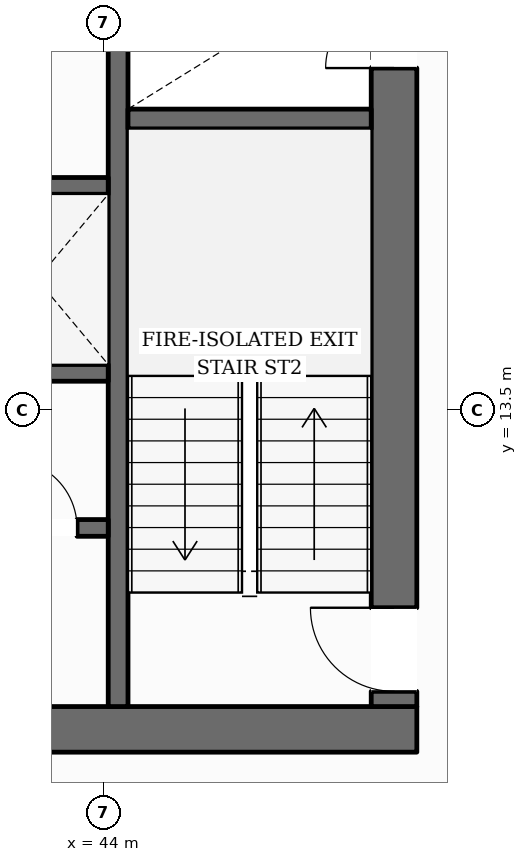
"""IFC4 building model, lengths in metres.
Left out: names, types, materials, properties, quantities, classifications, styles, units other than length and angle.
Written with IfcOpenShell. Run it as: python <this file> out.ifc"""

import sys

from ifc_helpers import new_model, si_unit, direction, frame, frame_2d, origin, place, context, subcontext, project, spatial, rectangle, extrude, element, fill, save


model = new_model("IFC4")
c1 = context("Model", 3, precision=1e-05, world=origin(), true_north=direction((0.0, 1.0)))
c2 = subcontext(c1, "Body", "Model", "MODEL_VIEW")
j1 = project(units=[si_unit("LENGTHUNIT", "METRE"), si_unit("PLANEANGLEUNIT", "RADIAN")], contexts=[c1])
p1 = place(None, origin())
s1 = spatial("IfcSite", under=j1, at=p1, CompositionType="ELEMENT")
p2 = place(p1, origin())
s2 = spatial("IfcBuilding", under=s1, at=p2, CompositionType="ELEMENT")
p3 = place(p2, frame((0.0, 0.0, 25.25)))
s3 = spatial("IfcBuildingStorey", under=s2, at=p3, CompositionType="ELEMENT", Elevation=25.25)
p4 = place(p3, frame((27.88, 9.3, 0.0), z_axis=(0.0, 0.0, 1.0), x_axis=(1.0, 0.0, 0.0)))
e1 = element("IfcWall", 1, at=p4, inside=s3, PredefinedType="SOLIDWALL", context=c2, shape_type="SweptSolid", body=[
    extrude(rectangle(XDim=20.24, YDim=0.6, at=frame_2d((10.12, 0.0))), origin(), (0.0, 0.0, 1.0), 3.59),
])
p5 = place(p4, frame((10.62, 0.0, 0.0)))
e2 = element("IfcOpeningElement", 2, at=p5, cuts=e1, PredefinedType="OPENING", context=c2, shape_type="SweptSolid", body=[
    extrude(rectangle(XDim=1.4, YDim=2.2, at=frame_2d((0.7, 1.1))), frame((0.0, 0.31, 0.0), z_axis=(0.0, -1.0, 0.0), x_axis=(1.0, 0.0, 0.0)), (0.0, 0.0, 1.0), 0.62),
])
p6 = place(p3, frame((47.82, 9.6, 0.0), z_axis=(0.0, 0.0, 1.0), x_axis=(0.0, 1.0, 0.0)))
e3 = element("IfcWall", 3, at=p6, inside=s3, PredefinedType="SOLIDWALL", context=c2, shape_type="SweptSolid", body=[
    extrude(rectangle(XDim=13.0, YDim=0.6, at=frame_2d((6.5, 0.0))), origin(), (0.0, 0.0, 1.0), 3.59),
])
p7 = place(p6, frame((0.2, 0.0, 0.0)))
e4 = element("IfcOpeningElement", 4, at=p7, cuts=e3, PredefinedType="OPENING", context=c2, shape_type="SweptSolid", body=[
    extrude(rectangle(XDim=1.1, YDim=2.15, at=frame_2d((0.55, 1.075))), frame((0.0, 0.31, 0.0), z_axis=(0.0, -1.0, 0.0), x_axis=(1.0, 0.0, 0.0)), (0.0, 0.0, 1.0), 0.62),
])
p8 = place(p6, frame((8.4, 0.0, 0.0)))
e5 = element("IfcOpeningElement", 5, at=p8, cuts=e3, PredefinedType="OPENING", context=c2, shape_type="SweptSolid", body=[
    extrude(rectangle(XDim=0.9, YDim=2.1, at=frame_2d((0.45, 1.05))), frame((0.0, 0.31, 0.0), z_axis=(0.0, -1.0, 0.0), x_axis=(1.0, 0.0, 0.0)), (0.0, 0.0, 1.0), 0.62),
])
p9 = place(p3, frame((44.19, 9.6, 0.0), z_axis=(0.0, 0.0, 1.0), x_axis=(0.0, 1.0, 0.0)))
e6 = element("IfcWall", 6, at=p9, inside=s3, PredefinedType="SHEAR", context=c2, shape_type="SweptSolid", body=[
    extrude(rectangle(XDim=13.0, YDim=0.26, at=frame_2d((6.5, 0.0))), origin(), (0.0, 0.0, 1.0), 3.59),
])
p10 = place(p9, frame((10.925, 0.0, 0.0)))
e7 = element("IfcOpeningElement", 7, at=p10, cuts=e6, PredefinedType="OPENING", context=c2, shape_type="SweptSolid", body=[
    extrude(rectangle(XDim=1.25, YDim=2.25, at=frame_2d((0.625, 1.125))), frame((0.0, 0.14, 0.0), z_axis=(0.0, -1.0, 0.0), x_axis=(1.0, 0.0, 0.0)), (0.0, 0.0, 1.0), 0.28),
])
p11 = place(p3, frame((44.32, 17.33, 0.0), z_axis=(0.0, 0.0, 1.0), x_axis=(1.0, 0.0, 0.0)))
e8 = element("IfcWall", 8, at=p11, inside=s3, PredefinedType="SHEAR", context=c2, shape_type="SweptSolid", body=[
    extrude(rectangle(XDim=3.2, YDim=0.26, at=frame_2d((1.6, 0.0))), origin(), (0.0, 0.0, 1.0), 3.59),
])
p12 = place(p3, frame((31.94, 16.45, 0.0), z_axis=(0.0, 0.0, 1.0), x_axis=(1.0, 0.0, 0.0)))
e9 = element("IfcWall", 9, at=p12, inside=s3, PredefinedType="SOLIDWALL", context=c2, shape_type="SweptSolid", body=[
    extrude(rectangle(XDim=12.12, YDim=0.22, at=frame_2d((6.06, 0.0))), origin(), (0.0, 0.0, 1.0), 3.59),
])
p13 = place(p3, frame((31.94, 13.99, 0.0), z_axis=(0.0, 0.0, 1.0), x_axis=(1.0, 0.0, 0.0)))
e10 = element("IfcWall", 10, at=p13, inside=s3, PredefinedType="SOLIDWALL", context=c2, shape_type="SweptSolid", body=[
    extrude(rectangle(XDim=12.12, YDim=0.22, at=frame_2d((6.06, 0.0))), origin(), (0.0, 0.0, 1.0), 3.59),
])
p14 = place(p13, frame((0.385, 0.0, 0.0)))
e11 = element("IfcOpeningElement", 11, at=p14, cuts=e10, PredefinedType="OPENING", context=c2, shape_type="SweptSolid", body=[
    extrude(rectangle(XDim=1.1, YDim=2.2, at=frame_2d((0.55, 1.1))), frame((0.0, 0.12, 0.0), z_axis=(0.0, -1.0, 0.0), x_axis=(1.0, 0.0, 0.0)), (0.0, 0.0, 1.0), 0.24),
])
p15 = place(p13, frame((2.435, 0.0, 0.0)))
e12 = element("IfcOpeningElement", 12, at=p15, cuts=e10, PredefinedType="OPENING", context=c2, shape_type="SweptSolid", body=[
    extrude(rectangle(XDim=1.1, YDim=2.2, at=frame_2d((0.55, 1.1))), frame((0.0, 0.12, 0.0), z_axis=(0.0, -1.0, 0.0), x_axis=(1.0, 0.0, 0.0)), (0.0, 0.0, 1.0), 0.24),
])
p16 = place(p13, frame((4.485, 0.0, 0.0)))
e13 = element("IfcOpeningElement", 13, at=p16, cuts=e10, PredefinedType="OPENING", context=c2, shape_type="SweptSolid", body=[
    extrude(rectangle(XDim=1.1, YDim=2.2, at=frame_2d((0.55, 1.1))), frame((0.0, 0.12, 0.0), z_axis=(0.0, -1.0, 0.0), x_axis=(1.0, 0.0, 0.0)), (0.0, 0.0, 1.0), 0.24),
])
p17 = place(p3, frame((40.28, 11.95, 0.0), z_axis=(0.0, 0.0, 1.0), x_axis=(1.0, 0.0, 0.0)))
e14 = element("IfcWall", 14, at=p17, inside=s3, PredefinedType="SOLIDWALL", context=c2, shape_type="SweptSolid", body=[
    extrude(rectangle(XDim=3.78, YDim=0.22, at=frame_2d((1.89, 0.0))), origin(), (0.0, 0.0, 1.0), 3.59),
])
p18 = place(p17, frame((0.62, 0.0, 0.0)))
e15 = element("IfcOpeningElement", 15, at=p18, cuts=e14, PredefinedType="OPENING", context=c2, shape_type="SweptSolid", body=[
    extrude(rectangle(XDim=0.9, YDim=2.1, at=frame_2d((0.45, 1.05))), frame((0.0, 0.12, 0.0), z_axis=(0.0, -1.0, 0.0), x_axis=(1.0, 0.0, 0.0)), (0.0, 0.0, 1.0), 0.24),
])
p19 = place(p17, frame((2.47, 0.0, 0.0)))
e16 = element("IfcOpeningElement", 16, at=p19, cuts=e14, PredefinedType="OPENING", context=c2, shape_type="SweptSolid", body=[
    extrude(rectangle(XDim=0.9, YDim=2.1, at=frame_2d((0.45, 1.05))), frame((0.0, 0.12, 0.0), z_axis=(0.0, -1.0, 0.0), x_axis=(1.0, 0.0, 0.0)), (0.0, 0.0, 1.0), 0.24),
])
p20 = place(p3, frame((45.837, 44.537, 0.0), z_axis=(0.0, 0.0, 1.0), x_axis=(0.495711630902, -0.868487178367, 0.0)))
e17 = element("IfcWall", 17, at=p20, inside=s3, PredefinedType="STANDARD", context=c2, shape_type="SweptSolid", body=[
    extrude(rectangle(XDim=34.092, YDim=0.38, at=frame_2d((17.046, 0.0))), origin(), (0.0, 0.0, 1.0), 2.97),
])
p21 = place(p20, frame((30.031, 0.0, 0.65)))
e18 = element("IfcOpeningElement", 18, at=p21, cuts=e17, PredefinedType="OPENING", context=c2, shape_type="SweptSolid", body=[
    extrude(rectangle(XDim=1.65, YDim=1.75, at=frame_2d((0.825, 0.875))), frame((0.0, 0.2, 0.0), z_axis=(0.0, -1.0, 0.0), x_axis=(1.0, 0.0, 0.0)), (0.0, 0.0, 1.0), 0.4),
])
p22 = place(p20, frame((24.508, 0.0, 0.65)))
e19 = element("IfcOpeningElement", 19, at=p22, cuts=e17, PredefinedType="OPENING", context=c2, shape_type="SweptSolid", body=[
    extrude(rectangle(XDim=1.65, YDim=1.75, at=frame_2d((0.825, 0.875))), frame((0.0, 0.2, 0.0), z_axis=(0.0, -1.0, 0.0), x_axis=(1.0, 0.0, 0.0)), (0.0, 0.0, 1.0), 0.4),
])
p23 = place(p20, frame((13.462, 0.0, 0.65)))
e20 = element("IfcOpeningElement", 20, at=p23, cuts=e17, PredefinedType="OPENING", context=c2, shape_type="SweptSolid", body=[
    extrude(rectangle(XDim=1.65, YDim=1.75, at=frame_2d((0.825, 0.875))), frame((0.0, 0.2, 0.0), z_axis=(0.0, -1.0, 0.0), x_axis=(1.0, 0.0, 0.0)), (0.0, 0.0, 1.0), 0.4),
])
p24 = place(p20, frame((7.939, 0.0, 0.65)))
e21 = element("IfcOpeningElement", 21, at=p24, cuts=e17, PredefinedType="OPENING", context=c2, shape_type="SweptSolid", body=[
    extrude(rectangle(XDim=1.65, YDim=1.75, at=frame_2d((0.825, 0.875))), frame((0.0, 0.2, 0.0), z_axis=(0.0, -1.0, 0.0), x_axis=(1.0, 0.0, 0.0)), (0.0, 0.0, 1.0), 0.4),
])
p25 = place(p20, frame((2.415, 0.0, 0.65)))
e22 = element("IfcOpeningElement", 22, at=p25, cuts=e17, PredefinedType="OPENING", context=c2, shape_type="SweptSolid", body=[
    extrude(rectangle(XDim=1.65, YDim=1.75, at=frame_2d((0.825, 0.875))), frame((0.0, 0.2, 0.0), z_axis=(0.0, -1.0, 0.0), x_axis=(1.0, 0.0, 0.0)), (0.0, 0.0, 1.0), 0.4),
])
p26 = place(p7, origin())
e23 = element("IfcDoor", 23, at=p26, inside=s3, OperationType="SINGLE_SWING_RIGHT", PredefinedType="DOOR", context=c2, shape_type="SweptSolid", body=[
    extrude(rectangle(XDim=1.1, YDim=2.15, at=frame_2d((0.55, 1.075))), frame((0.0, 0.025, 0.0), z_axis=(0.0, -1.0, 0.0), x_axis=(1.0, 0.0, 0.0)), (0.0, 0.0, 1.0), 0.05),
])
fill(e4, e23)
p27 = place(p8, origin())
e24 = element("IfcDoor", 24, at=p27, inside=s3, OperationType="SINGLE_SWING_LEFT", PredefinedType="DOOR", context=c2, shape_type="SweptSolid", body=[
    extrude(rectangle(XDim=0.9, YDim=2.1, at=frame_2d((0.45, 1.05))), frame((0.0, 0.025, 0.0), z_axis=(0.0, -1.0, 0.0), x_axis=(1.0, 0.0, 0.0)), (0.0, 0.0, 1.0), 0.05),
])
fill(e5, e24)
p28 = place(p19, origin())
e25 = element("IfcDoor", 25, at=p28, inside=s3, OperationType="SINGLE_SWING_LEFT", PredefinedType="DOOR", context=c2, shape_type="SweptSolid", body=[
    extrude(rectangle(XDim=0.9, YDim=2.1, at=frame_2d((0.45, 1.05))), frame((0.0, 0.025, 0.0), z_axis=(0.0, -1.0, 0.0), x_axis=(1.0, 0.0, 0.0)), (0.0, 0.0, 1.0), 0.05),
])
fill(e16, e25)
save(model, sys.argv[1])
